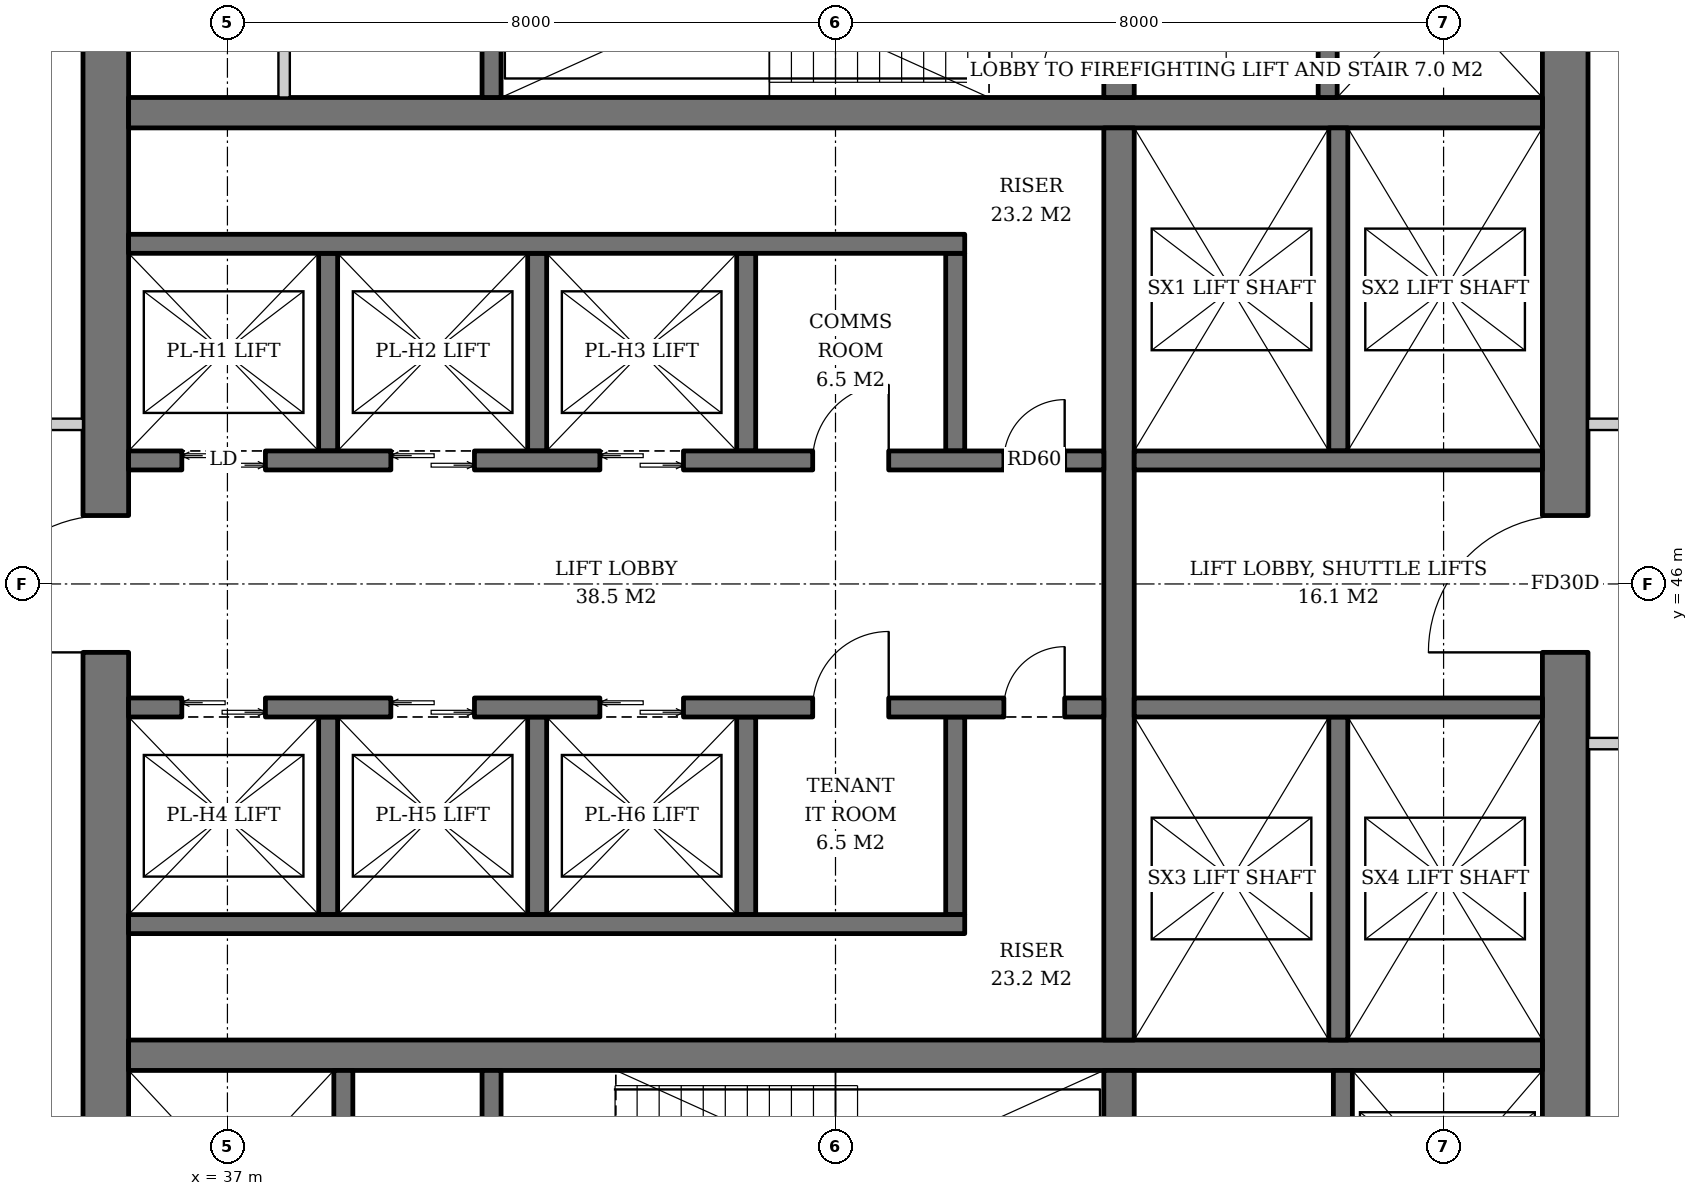
"""IFC4 building model, lengths in metres.
Left out: names, types, materials, properties, quantities, classifications, styles, units other than length and angle.
Written with IfcOpenShell. Run it as: python <this file> out.ifc"""

import sys

from ifc_helpers import new_model, si_unit, direction, frame, frame_2d, origin, place, context, subcontext, project, spatial, rectangle, extrude, element, fill, save


model = new_model("IFC4")
c1 = context("Model", 3, precision=1e-05, world=origin(), true_north=direction((0.0, 1.0)))
c2 = subcontext(c1, "Body", "Model", "MODEL_VIEW")
j1 = project(units=[si_unit("LENGTHUNIT", "METRE"), si_unit("PLANEANGLEUNIT", "RADIAN")], contexts=[c1])
p1 = place(None, origin())
s1 = spatial("IfcSite", under=j1, at=p1, CompositionType="ELEMENT")
p2 = place(p1, origin())
s2 = spatial("IfcBuilding", under=s1, at=p2, CompositionType="ELEMENT")
p3 = place(p2, frame((0.0, 0.0, 192.0)))
s3 = spatial("IfcBuildingStorey", under=s2, at=p3, CompositionType="ELEMENT", Elevation=192.0)
p4 = place(p3, frame((35.4, 36.7, 0.0), z_axis=(0.0, 0.0, 1.0), x_axis=(0.0, 1.0, 0.0)))
e1 = element("IfcWall", 1, at=p4, inside=s3, PredefinedType="SHEAR", context=c2, shape_type="SweptSolid", body=[
    extrude(rectangle(XDim=18.6, YDim=0.6, at=frame_2d((9.3, 0.0))), origin(), (0.0, 0.0, 1.0), 3.8),
])
p5 = place(p4, frame((8.4, 0.0, 0.0)))
e2 = element("IfcOpeningElement", 2, at=p5, cuts=e1, PredefinedType="OPENING", context=c2, shape_type="SweptSolid", body=[
    extrude(rectangle(XDim=1.8, YDim=2.4, at=frame_2d((0.9, 1.2))), frame((0.0, 0.31, 0.0), z_axis=(0.0, -1.0, 0.0), x_axis=(1.0, 0.0, 0.0)), (0.0, 0.0, 1.0), 0.62),
])
p6 = place(p3, frame((54.6, 36.7, 0.0), z_axis=(0.0, 0.0, 1.0), x_axis=(0.0, 1.0, 0.0)))
e3 = element("IfcWall", 3, at=p6, inside=s3, PredefinedType="SHEAR", context=c2, shape_type="SweptSolid", body=[
    extrude(rectangle(XDim=18.6, YDim=0.6, at=frame_2d((9.3, 0.0))), origin(), (0.0, 0.0, 1.0), 3.8),
])
p7 = place(p6, frame((8.4, 0.0, 0.0)))
e4 = element("IfcOpeningElement", 4, at=p7, cuts=e3, PredefinedType="OPENING", context=c2, shape_type="SweptSolid", body=[
    extrude(rectangle(XDim=1.8, YDim=2.4, at=frame_2d((0.9, 1.2))), frame((0.0, 0.31, 0.0), z_axis=(0.0, -1.0, 0.0), x_axis=(1.0, 0.0, 0.0)), (0.0, 0.0, 1.0), 0.62),
])
for number, where, z_axis, x_axis in (
    (5, (35.7, 39.8, 0.0), (0.0, 0.0, 1.0), (1.0, 0.0, 0.0)),
    (6, (35.7, 52.2, 0.0), (0.0, 0.0, 1.0), (1.0, 0.0, 0.0)),
):
    element("IfcWall", number, at=place(p3, frame(where, z_axis=z_axis, x_axis=x_axis)), inside=s3, PredefinedType="SHEAR", context=c2, shape_type="SweptSolid", body=[
        extrude(rectangle(XDim=18.6, YDim=0.4, at=frame_2d((9.3, 0.0))), origin(), (0.0, 0.0, 1.0), 3.8),
    ])
p8 = place(p3, frame((48.73, 36.7, 0.0), z_axis=(0.0, 0.0, 1.0), x_axis=(0.0, 1.0, 0.0)))
e7 = element("IfcWall", 7, at=p8, inside=s3, PredefinedType="SHEAR", context=c2, shape_type="SweptSolid", body=[
    extrude(rectangle(XDim=2.9, YDim=0.4, at=frame_2d((1.45, 0.0))), origin(), (0.0, 0.0, 1.0), 3.8),
])
p9 = place(p3, frame((48.73, 40.0, 0.0), z_axis=(0.0, 0.0, 1.0), x_axis=(0.0, 1.0, 0.0)))
e8 = element("IfcWall", 8, at=p9, inside=s3, PredefinedType="SHEAR", context=c2, shape_type="SweptSolid", body=[
    extrude(rectangle(XDim=12.0, YDim=0.4, at=frame_2d((6.0, 0.0))), origin(), (0.0, 0.0, 1.0), 3.8),
])
p10 = place(p3, frame((48.73, 52.4, 0.0), z_axis=(0.0, 0.0, 1.0), x_axis=(0.0, 1.0, 0.0)))
e9 = element("IfcWall", 9, at=p10, inside=s3, PredefinedType="SHEAR", context=c2, shape_type="SweptSolid", body=[
    extrude(rectangle(XDim=2.9, YDim=0.4, at=frame_2d((1.45, 0.0))), origin(), (0.0, 0.0, 1.0), 3.8),
])
p11 = place(p10, frame((0.3, 0.0, 0.0)))
e10 = element("IfcOpeningElement", 10, at=p11, cuts=e9, PredefinedType="OPENING", context=c2, shape_type="SweptSolid", body=[
    extrude(rectangle(XDim=1.0, YDim=2.1, at=frame_2d((0.5, 1.05))), frame((0.0, 0.21, 0.0), z_axis=(0.0, -1.0, 0.0), x_axis=(1.0, 0.0, 0.0)), (0.0, 0.0, 1.0), 0.42),
])
p12 = place(p3, frame((38.525, 36.7, 0.0), z_axis=(0.0, 0.0, 1.0), x_axis=(0.0, 1.0, 0.0)))
e11 = element("IfcWall", 11, at=p12, inside=s3, PredefinedType="SHEAR", context=c2, shape_type="SweptSolid", body=[
    extrude(rectangle(XDim=2.9, YDim=0.25, at=frame_2d((1.45, 0.0))), origin(), (0.0, 0.0, 1.0), 3.8),
])
p13 = place(p12, frame((0.8, 0.0, 0.0)))
e12 = element("IfcOpeningElement", 12, at=p13, cuts=e11, PredefinedType="OPENING", context=c2, shape_type="SweptSolid", body=[
    extrude(rectangle(XDim=1.3, YDim=2.2, at=frame_2d((0.65, 1.1))), frame((0.0, 0.135, 0.0), z_axis=(0.0, -1.0, 0.0), x_axis=(1.0, 0.0, 0.0)), (0.0, 0.0, 1.0), 0.27),
])
p14 = place(p3, frame((40.475, 36.7, 0.0), z_axis=(0.0, 0.0, 1.0), x_axis=(0.0, 1.0, 0.0)))
e13 = element("IfcWall", 13, at=p14, inside=s3, PredefinedType="SHEAR", context=c2, shape_type="SweptSolid", body=[
    extrude(rectangle(XDim=2.9, YDim=0.25, at=frame_2d((1.45, 0.0))), origin(), (0.0, 0.0, 1.0), 3.8),
])
p15 = place(p14, frame((0.75, 0.0, 0.0)))
e14 = element("IfcOpeningElement", 14, at=p15, cuts=e13, PredefinedType="OPENING", context=c2, shape_type="SweptSolid", body=[
    extrude(rectangle(XDim=1.2, YDim=2.1, at=frame_2d((0.6, 1.05))), frame((0.0, 0.135, 0.0), z_axis=(0.0, -1.0, 0.0), x_axis=(1.0, 0.0, 0.0)), (0.0, 0.0, 1.0), 0.27),
])
p16 = place(p3, frame((51.675, 36.7, 0.0), z_axis=(0.0, 0.0, 1.0), x_axis=(0.0, 1.0, 0.0)))
e15 = element("IfcWall", 15, at=p16, inside=s3, PredefinedType="SHEAR", context=c2, shape_type="SweptSolid", body=[
    extrude(rectangle(XDim=2.9, YDim=0.25, at=frame_2d((1.45, 0.0))), origin(), (0.0, 0.0, 1.0), 3.8),
])
p17 = place(p16, frame((0.75, 0.0, 0.0)))
e16 = element("IfcOpeningElement", 16, at=p17, cuts=e15, PredefinedType="OPENING", context=c2, shape_type="SweptSolid", body=[
    extrude(rectangle(XDim=1.4, YDim=2.4, at=frame_2d((0.7, 1.2))), frame((0.0, 0.135, 0.0), z_axis=(0.0, -1.0, 0.0), x_axis=(1.0, 0.0, 0.0)), (0.0, 0.0, 1.0), 0.27),
])
p18 = place(p3, frame((40.475, 52.4, 0.0), z_axis=(0.0, 0.0, 1.0), x_axis=(0.0, 1.0, 0.0)))
e17 = element("IfcWall", 17, at=p18, inside=s3, PredefinedType="SHEAR", context=c2, shape_type="SweptSolid", body=[
    extrude(rectangle(XDim=2.9, YDim=0.25, at=frame_2d((1.45, 0.0))), origin(), (0.0, 0.0, 1.0), 3.8),
])
p19 = place(p3, frame((51.475, 52.4, 0.0), z_axis=(0.0, 0.0, 1.0), x_axis=(0.0, 1.0, 0.0)))
e18 = element("IfcWall", 18, at=p19, inside=s3, PredefinedType="SHEAR", context=c2, shape_type="SweptSolid", body=[
    extrude(rectangle(XDim=2.9, YDim=0.25, at=frame_2d((1.45, 0.0))), origin(), (0.0, 0.0, 1.0), 3.8),
])
p20 = place(p19, frame((0.8, 0.0, 0.0)))
e19 = element("IfcOpeningElement", 19, at=p20, cuts=e18, PredefinedType="OPENING", context=c2, shape_type="SweptSolid", body=[
    extrude(rectangle(XDim=1.3, YDim=2.2, at=frame_2d((0.65, 1.1))), frame((0.0, 0.135, 0.0), z_axis=(0.0, -1.0, 0.0), x_axis=(1.0, 0.0, 0.0)), (0.0, 0.0, 1.0), 0.27),
])
for number, where, z_axis, x_axis in (
    (20, (38.325, 47.75, 0.0), (0.0, 0.0, 1.0), (0.0, 1.0, 0.0)),
    (21, (41.075, 47.75, 0.0), (0.0, 0.0, 1.0), (0.0, 1.0, 0.0)),
    (22, (43.825, 47.75, 0.0), (0.0, 0.0, 1.0), (0.0, 1.0, 0.0)),
    (23, (46.575, 47.75, 0.0), (0.0, 0.0, 1.0), (0.0, 1.0, 0.0)),
):
    element("IfcWall", number, at=place(p3, frame(where, z_axis=z_axis, x_axis=x_axis)), inside=s3, PredefinedType="SHEAR", context=c2, shape_type="SweptSolid", body=[
        extrude(rectangle(XDim=2.6, YDim=0.25, at=frame_2d((1.3, 0.0))), origin(), (0.0, 0.0, 1.0), 3.8),
    ])
p21 = place(p3, frame((35.7, 50.475, 0.0), z_axis=(0.0, 0.0, 1.0), x_axis=(1.0, 0.0, 0.0)))
e24 = element("IfcWall", 24, at=p21, inside=s3, PredefinedType="SHEAR", context=c2, shape_type="SweptSolid", body=[
    extrude(rectangle(XDim=11.0, YDim=0.25, at=frame_2d((5.5, 0.0))), origin(), (0.0, 0.0, 1.0), 3.8),
])
p22 = place(p3, frame((35.7, 47.625, 0.0), z_axis=(0.0, 0.0, 1.0), x_axis=(1.0, 0.0, 0.0)))
e25 = element("IfcWall", 25, at=p22, inside=s3, PredefinedType="SHEAR", context=c2, shape_type="SweptSolid", body=[
    extrude(rectangle(XDim=12.83, YDim=0.25, at=frame_2d((6.415, 0.0))), origin(), (0.0, 0.0, 1.0), 3.8),
])
p23 = place(p22, frame((0.7, 0.0, 0.0)))
e26 = element("IfcOpeningElement", 26, at=p23, cuts=e25, PredefinedType="OPENING", context=c2, shape_type="SweptSolid", body=[
    extrude(rectangle(XDim=1.1, YDim=2.2, at=frame_2d((0.55, 1.1))), frame((0.0, 0.135, 0.0), z_axis=(0.0, -1.0, 0.0), x_axis=(1.0, 0.0, 0.0)), (0.0, 0.0, 1.0), 0.27),
])
p24 = place(p22, frame((3.45, 0.0, 0.0)))
e27 = element("IfcOpeningElement", 27, at=p24, cuts=e25, PredefinedType="OPENING", context=c2, shape_type="SweptSolid", body=[
    extrude(rectangle(XDim=1.1, YDim=2.2, at=frame_2d((0.55, 1.1))), frame((0.0, 0.135, 0.0), z_axis=(0.0, -1.0, 0.0), x_axis=(1.0, 0.0, 0.0)), (0.0, 0.0, 1.0), 0.27),
])
p25 = place(p22, frame((6.2, 0.0, 0.0)))
e28 = element("IfcOpeningElement", 28, at=p25, cuts=e25, PredefinedType="OPENING", context=c2, shape_type="SweptSolid", body=[
    extrude(rectangle(XDim=1.1, YDim=2.2, at=frame_2d((0.55, 1.1))), frame((0.0, 0.135, 0.0), z_axis=(0.0, -1.0, 0.0), x_axis=(1.0, 0.0, 0.0)), (0.0, 0.0, 1.0), 0.27),
])
p26 = place(p22, frame((9.0, 0.0, 0.0)))
e29 = element("IfcOpeningElement", 29, at=p26, cuts=e25, PredefinedType="OPENING", context=c2, shape_type="SweptSolid", body=[
    extrude(rectangle(XDim=1.0, YDim=2.1, at=frame_2d((0.5, 1.05))), frame((0.0, 0.135, 0.0), z_axis=(0.0, -1.0, 0.0), x_axis=(1.0, 0.0, 0.0)), (0.0, 0.0, 1.0), 0.27),
])
p27 = place(p22, frame((11.515, 0.0, 0.0)))
e30 = element("IfcOpeningElement", 30, at=p27, cuts=e25, PredefinedType="OPENING", context=c2, shape_type="SweptSolid", body=[
    extrude(rectangle(XDim=0.8, YDim=2.0, at=frame_2d((0.4, 1.0))), frame((0.0, 0.135, 0.0), z_axis=(0.0, -1.0, 0.0), x_axis=(1.0, 0.0, 0.0)), (0.0, 0.0, 1.0), 0.27),
])
for number, where, z_axis, x_axis in (
    (31, (38.325, 44.25, 0.0), (0.0, 0.0, 1.0), (0.0, -1.0, 0.0)),
    (32, (41.075, 44.25, 0.0), (0.0, 0.0, 1.0), (0.0, -1.0, 0.0)),
    (33, (43.825, 44.25, 0.0), (0.0, 0.0, 1.0), (0.0, -1.0, 0.0)),
    (34, (46.575, 44.25, 0.0), (0.0, 0.0, 1.0), (0.0, -1.0, 0.0)),
):
    element("IfcWall", number, at=place(p3, frame(where, z_axis=z_axis, x_axis=x_axis)), inside=s3, PredefinedType="SHEAR", context=c2, shape_type="SweptSolid", body=[
        extrude(rectangle(XDim=2.6, YDim=0.25, at=frame_2d((1.3, 0.0))), origin(), (0.0, 0.0, 1.0), 3.8),
    ])
p28 = place(p3, frame((35.7, 41.525, 0.0), z_axis=(0.0, 0.0, 1.0), x_axis=(1.0, 0.0, 0.0)))
e35 = element("IfcWall", 35, at=p28, inside=s3, PredefinedType="SHEAR", context=c2, shape_type="SweptSolid", body=[
    extrude(rectangle(XDim=11.0, YDim=0.25, at=frame_2d((5.5, 0.0))), origin(), (0.0, 0.0, 1.0), 3.8),
])
p29 = place(p3, frame((35.7, 44.375, 0.0), z_axis=(0.0, 0.0, 1.0), x_axis=(1.0, 0.0, 0.0)))
e36 = element("IfcWall", 36, at=p29, inside=s3, PredefinedType="SHEAR", context=c2, shape_type="SweptSolid", body=[
    extrude(rectangle(XDim=12.83, YDim=0.25, at=frame_2d((6.415, 0.0))), origin(), (0.0, 0.0, 1.0), 3.8),
])
p30 = place(p29, frame((0.7, 0.0, 0.0)))
e37 = element("IfcOpeningElement", 37, at=p30, cuts=e36, PredefinedType="OPENING", context=c2, shape_type="SweptSolid", body=[
    extrude(rectangle(XDim=1.1, YDim=2.2, at=frame_2d((0.55, 1.1))), frame((0.0, 0.135, 0.0), z_axis=(0.0, -1.0, 0.0), x_axis=(1.0, 0.0, 0.0)), (0.0, 0.0, 1.0), 0.27),
])
p31 = place(p29, frame((3.45, 0.0, 0.0)))
e38 = element("IfcOpeningElement", 38, at=p31, cuts=e36, PredefinedType="OPENING", context=c2, shape_type="SweptSolid", body=[
    extrude(rectangle(XDim=1.1, YDim=2.2, at=frame_2d((0.55, 1.1))), frame((0.0, 0.135, 0.0), z_axis=(0.0, -1.0, 0.0), x_axis=(1.0, 0.0, 0.0)), (0.0, 0.0, 1.0), 0.27),
])
p32 = place(p29, frame((6.2, 0.0, 0.0)))
e39 = element("IfcOpeningElement", 39, at=p32, cuts=e36, PredefinedType="OPENING", context=c2, shape_type="SweptSolid", body=[
    extrude(rectangle(XDim=1.1, YDim=2.2, at=frame_2d((0.55, 1.1))), frame((0.0, 0.135, 0.0), z_axis=(0.0, -1.0, 0.0), x_axis=(1.0, 0.0, 0.0)), (0.0, 0.0, 1.0), 0.27),
])
p33 = place(p29, frame((9.0, 0.0, 0.0)))
e40 = element("IfcOpeningElement", 40, at=p33, cuts=e36, PredefinedType="OPENING", context=c2, shape_type="SweptSolid", body=[
    extrude(rectangle(XDim=1.0, YDim=2.1, at=frame_2d((0.5, 1.05))), frame((0.0, 0.135, 0.0), z_axis=(0.0, -1.0, 0.0), x_axis=(1.0, 0.0, 0.0)), (0.0, 0.0, 1.0), 0.27),
])
p34 = place(p29, frame((11.515, 0.0, 0.0)))
e41 = element("IfcOpeningElement", 41, at=p34, cuts=e36, PredefinedType="OPENING", context=c2, shape_type="SweptSolid", body=[
    extrude(rectangle(XDim=0.8, YDim=2.0, at=frame_2d((0.4, 1.0))), frame((0.0, 0.135, 0.0), z_axis=(0.0, -1.0, 0.0), x_axis=(1.0, 0.0, 0.0)), (0.0, 0.0, 1.0), 0.27),
])
p35 = place(p3, frame((51.615, 47.75, 0.0), z_axis=(0.0, 0.0, 1.0), x_axis=(0.0, 1.0, 0.0)))
e42 = element("IfcWall", 42, at=p35, inside=s3, PredefinedType="SHEAR", context=c2, shape_type="SweptSolid", body=[
    extrude(rectangle(XDim=4.25, YDim=0.25, at=frame_2d((2.125, 0.0))), origin(), (0.0, 0.0, 1.0), 3.8),
])
p36 = place(p3, frame((48.93, 47.625, 0.0), z_axis=(0.0, 0.0, 1.0), x_axis=(1.0, 0.0, 0.0)))
e43 = element("IfcWall", 43, at=p36, inside=s3, PredefinedType="SHEAR", context=c2, shape_type="SweptSolid", body=[
    extrude(rectangle(XDim=5.37, YDim=0.25, at=frame_2d((2.685, 0.0))), origin(), (0.0, 0.0, 1.0), 3.8),
])
p37 = place(p3, frame((51.615, 44.25, 0.0), z_axis=(0.0, 0.0, 1.0), x_axis=(0.0, -1.0, 0.0)))
e44 = element("IfcWall", 44, at=p37, inside=s3, PredefinedType="SHEAR", context=c2, shape_type="SweptSolid", body=[
    extrude(rectangle(XDim=4.25, YDim=0.25, at=frame_2d((2.125, 0.0))), origin(), (0.0, 0.0, 1.0), 3.8),
])
p38 = place(p3, frame((48.93, 44.375, 0.0), z_axis=(0.0, 0.0, 1.0), x_axis=(1.0, 0.0, 0.0)))
e45 = element("IfcWall", 45, at=p38, inside=s3, PredefinedType="SHEAR", context=c2, shape_type="SweptSolid", body=[
    extrude(rectangle(XDim=5.37, YDim=0.25, at=frame_2d((2.685, 0.0))), origin(), (0.0, 0.0, 1.0), 3.8),
])
p39 = place(p3, frame((37.746, 52.4, 0.0), z_axis=(0.0, 0.0, 1.0), x_axis=(0.0, 1.0, 0.0)))
e46 = element("IfcWall", 46, at=p39, inside=s3, PredefinedType="SOLIDWALL", context=c2, shape_type="SweptSolid", body=[
    extrude(rectangle(XDim=2.9, YDim=0.15, at=frame_2d((1.45, 0.0))), origin(), (0.0, 0.0, 1.0), 3.62),
])
for number, where, z_axis, x_axis in (
    (47, (54.9, 43.9, 0.0), (0.0, 0.0, 1.0), (1.0, 0.0, 0.0)),
    (48, (54.9, 48.1, 0.0), (0.0, 0.0, 1.0), (1.0, 0.0, 0.0)),
    (49, (35.1, 48.1, 0.0), (0.0, 0.0, 1.0), (-1.0, 0.0, 0.0)),
):
    element("IfcWall", number, at=place(p3, frame(where, z_axis=z_axis, x_axis=x_axis)), inside=s3, PredefinedType="PARTITIONING", context=c2, shape_type="SweptSolid", body=[
        extrude(rectangle(XDim=2.325, YDim=0.15, at=frame_2d((1.163, 0.0))), origin(), (0.0, 0.0, 1.0), 3.62),
    ])
p40 = place(p23, origin())
e50 = element("IfcDoor", 50, at=p40, inside=s3, OperationType="DOUBLE_DOOR_SLIDING", PredefinedType="DOOR", context=c2, shape_type="SweptSolid", body=[
    extrude(rectangle(XDim=1.1, YDim=2.2, at=frame_2d((0.55, 1.1))), frame((0.0, 0.025, 0.0), z_axis=(0.0, -1.0, 0.0), x_axis=(1.0, 0.0, 0.0)), (0.0, 0.0, 1.0), 0.05),
])
fill(e26, e50)
p41 = place(p24, origin())
e51 = element("IfcDoor", 51, at=p41, inside=s3, OperationType="DOUBLE_DOOR_SLIDING", PredefinedType="DOOR", context=c2, shape_type="SweptSolid", body=[
    extrude(rectangle(XDim=1.1, YDim=2.2, at=frame_2d((0.55, 1.1))), frame((0.0, 0.025, 0.0), z_axis=(0.0, -1.0, 0.0), x_axis=(1.0, 0.0, 0.0)), (0.0, 0.0, 1.0), 0.05),
])
fill(e27, e51)
p42 = place(p25, origin())
e52 = element("IfcDoor", 52, at=p42, inside=s3, OperationType="DOUBLE_DOOR_SLIDING", PredefinedType="DOOR", context=c2, shape_type="SweptSolid", body=[
    extrude(rectangle(XDim=1.1, YDim=2.2, at=frame_2d((0.55, 1.1))), frame((0.0, 0.025, 0.0), z_axis=(0.0, -1.0, 0.0), x_axis=(1.0, 0.0, 0.0)), (0.0, 0.0, 1.0), 0.05),
])
fill(e28, e52)
p43 = place(p26, origin())
e53 = element("IfcDoor", 53, at=p43, inside=s3, OperationType="SINGLE_SWING_RIGHT", PredefinedType="DOOR", context=c2, shape_type="SweptSolid", body=[
    extrude(rectangle(XDim=1.0, YDim=2.1, at=frame_2d((0.5, 1.05))), frame((0.0, 0.025, 0.0), z_axis=(0.0, -1.0, 0.0), x_axis=(1.0, 0.0, 0.0)), (0.0, 0.0, 1.0), 0.05),
])
fill(e29, e53)
p44 = place(p27, origin())
e54 = element("IfcDoor", 54, at=p44, inside=s3, OperationType="SINGLE_SWING_RIGHT", PredefinedType="DOOR", context=c2, shape_type="SweptSolid", body=[
    extrude(rectangle(XDim=0.8, YDim=2.0, at=frame_2d((0.4, 1.0))), frame((0.0, 0.025, 0.0), z_axis=(0.0, -1.0, 0.0), x_axis=(1.0, 0.0, 0.0)), (0.0, 0.0, 1.0), 0.05),
])
fill(e30, e54)
p45 = place(p30, origin())
e55 = element("IfcDoor", 55, at=p45, inside=s3, OperationType="DOUBLE_DOOR_SLIDING", PredefinedType="DOOR", context=c2, shape_type="SweptSolid", body=[
    extrude(rectangle(XDim=1.1, YDim=2.2, at=frame_2d((0.55, 1.1))), frame((0.0, 0.025, 0.0), z_axis=(0.0, -1.0, 0.0), x_axis=(1.0, 0.0, 0.0)), (0.0, 0.0, 1.0), 0.05),
])
fill(e37, e55)
p46 = place(p31, origin())
e56 = element("IfcDoor", 56, at=p46, inside=s3, OperationType="DOUBLE_DOOR_SLIDING", PredefinedType="DOOR", context=c2, shape_type="SweptSolid", body=[
    extrude(rectangle(XDim=1.1, YDim=2.2, at=frame_2d((0.55, 1.1))), frame((0.0, 0.025, 0.0), z_axis=(0.0, -1.0, 0.0), x_axis=(1.0, 0.0, 0.0)), (0.0, 0.0, 1.0), 0.05),
])
fill(e38, e56)
p47 = place(p32, origin())
e57 = element("IfcDoor", 57, at=p47, inside=s3, OperationType="DOUBLE_DOOR_SLIDING", PredefinedType="DOOR", context=c2, shape_type="SweptSolid", body=[
    extrude(rectangle(XDim=1.1, YDim=2.2, at=frame_2d((0.55, 1.1))), frame((0.0, 0.025, 0.0), z_axis=(0.0, -1.0, 0.0), x_axis=(1.0, 0.0, 0.0)), (0.0, 0.0, 1.0), 0.05),
])
fill(e39, e57)
p48 = place(p33, origin())
e58 = element("IfcDoor", 58, at=p48, inside=s3, OperationType="SINGLE_SWING_RIGHT", PredefinedType="DOOR", context=c2, shape_type="SweptSolid", body=[
    extrude(rectangle(XDim=1.0, YDim=2.1, at=frame_2d((0.5, 1.05))), frame((0.0, 0.025, 0.0), z_axis=(0.0, -1.0, 0.0), x_axis=(1.0, 0.0, 0.0)), (0.0, 0.0, 1.0), 0.05),
])
fill(e40, e58)
p49 = place(p34, origin())
e59 = element("IfcDoor", 59, at=p49, inside=s3, OperationType="SINGLE_SWING_RIGHT", PredefinedType="DOOR", context=c2, shape_type="SweptSolid", body=[
    extrude(rectangle(XDim=0.8, YDim=2.0, at=frame_2d((0.4, 1.0))), frame((0.0, 0.025, 0.0), z_axis=(0.0, -1.0, 0.0), x_axis=(1.0, 0.0, 0.0)), (0.0, 0.0, 1.0), 0.05),
])
fill(e41, e59)
p50 = place(p11, origin())
e60 = element("IfcDoor", 60, at=p50, inside=s3, OperationType="SINGLE_SWING_LEFT", PredefinedType="DOOR", context=c2, shape_type="SweptSolid", body=[
    extrude(rectangle(XDim=1.0, YDim=2.1, at=frame_2d((0.5, 1.05))), frame((0.0, 0.025, 0.0), z_axis=(0.0, -1.0, 0.0), x_axis=(1.0, 0.0, 0.0)), (0.0, 0.0, 1.0), 0.05),
])
fill(e10, e60)
p51 = place(p5, origin())
e61 = element("IfcDoor", 61, at=p51, inside=s3, OperationType="DOUBLE_DOOR_SINGLE_SWING", PredefinedType="DOOR", context=c2, shape_type="SweptSolid", body=[
    extrude(rectangle(XDim=1.8, YDim=2.4, at=frame_2d((0.9, 1.2))), frame((0.0, 0.025, 0.0), z_axis=(0.0, -1.0, 0.0), x_axis=(1.0, 0.0, 0.0)), (0.0, 0.0, 1.0), 0.05),
])
fill(e2, e61)
p52 = place(p7, origin())
e62 = element("IfcDoor", 62, at=p52, inside=s3, OperationType="DOUBLE_DOOR_SINGLE_SWING", PredefinedType="DOOR", context=c2, shape_type="SweptSolid", body=[
    extrude(rectangle(XDim=1.8, YDim=2.4, at=frame_2d((0.9, 1.2))), frame((0.0, 0.025, 0.0), z_axis=(0.0, -1.0, 0.0), x_axis=(1.0, 0.0, 0.0)), (0.0, 0.0, 1.0), 0.05),
])
fill(e4, e62)
save(model, sys.argv[1])
